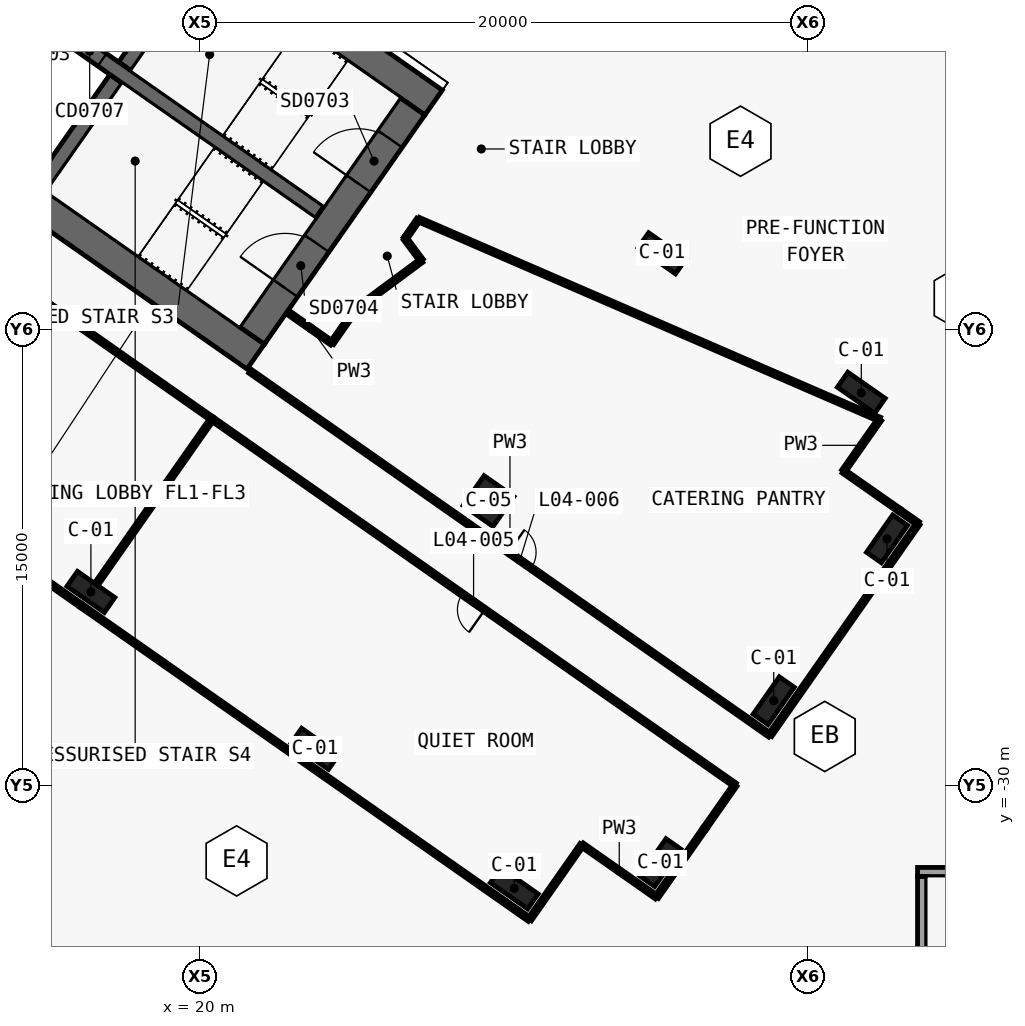
"""IFC4 building model, lengths in metres.
Left out: names, types, materials, properties, quantities, classifications, styles, units other than length and angle.
Written with IfcOpenShell. Run it as: python <this file> out.ifc"""

import sys

from ifc_helpers import new_model, si_unit, direction, frame, frame_2d, origin, origin_2d, place, context, subcontext, project, spatial, polyline, rectangle, outline, extrude, element, fill, save


model = new_model("IFC4")
c1 = context("Model", 3, precision=1e-05, world=origin(), true_north=direction((0.0, 1.0)))
c2 = subcontext(c1, "Body", "Model", "MODEL_VIEW")
j1 = project(units=[si_unit("LENGTHUNIT", "METRE"), si_unit("PLANEANGLEUNIT", "RADIAN")], contexts=[c1])
p1 = place(None, origin())
s1 = spatial("IfcSite", under=j1, at=p1, CompositionType="ELEMENT")
p2 = place(p1, origin())
s2 = spatial("IfcBuilding", under=s1, at=p2, CompositionType="ELEMENT")
p3 = place(p2, frame((0.0, 0.0, 32.0)))
s3 = spatial("IfcBuildingStorey", under=s2, at=p3, CompositionType="ELEMENT", Elevation=32.0)
p4 = place(p3, frame((-0.037, 11.867, 0.0), z_axis=(0.0, 0.0, 1.0), x_axis=(0.819155306259, -0.573571777746, 0.0)))
e1 = element("IfcWall", 1, at=p4, inside=s3, PredefinedType="SHEAR", context=c2, shape_type="SweptSolid", body=[
    extrude(outline(polyline([(33.837, 0.5), (0.0, 0.5), (0.7, -0.5), (33.837, -0.5), (33.837, 0.5)])), origin(), (0.0, 0.0, 1.0), 5.5),
])
p5 = place(p3, frame((-0.037, -0.585, 0.0), z_axis=(0.0, 0.0, 1.0), x_axis=(0.819157152511, -0.573569140985, 0.0)))
e2 = element("IfcWall", 2, at=p5, inside=s3, PredefinedType="SHEAR", context=c2, shape_type="SweptSolid", body=[
    extrude(outline(polyline([(26.695, 0.5), (0.0, 0.5), (0.7, -0.5), (26.695, -0.5), (26.695, 0.5)])), origin(), (0.0, 0.0, 1.0), 5.5),
])
p6 = place(p5, frame((1.045, 0.0, 0.0)))
e3 = element("IfcOpeningElement", 3, at=p6, cuts=e2, PredefinedType="OPENING", context=c2, shape_type="SweptSolid", body=[
    extrude(rectangle(XDim=1.5, YDim=2.1, at=frame_2d((0.75, 1.05))), frame((0.0, 0.51, 0.0), z_axis=(0.0, -1.0, 0.0), x_axis=(1.0, 0.0, 0.0)), (0.0, 0.0, 1.0), 1.02),
])
p7 = place(p5, frame((12.445, 0.0, 0.0)))
e4 = element("IfcOpeningElement", 4, at=p7, cuts=e2, PredefinedType="OPENING", context=c2, shape_type="SweptSolid", body=[
    extrude(rectangle(XDim=1.5, YDim=2.1, at=frame_2d((0.75, 1.05))), frame((0.0, 0.51, 0.0), z_axis=(0.0, -1.0, 0.0), x_axis=(1.0, 0.0, 0.0)), (0.0, 0.0, 1.0), 1.02),
])
p8 = place(p3, frame((21.708, -15.2, 0.0), z_axis=(0.0, 0.0, 1.0), x_axis=(0.573576324356, 0.819152122709, 0.0)))
e5 = element("IfcWall", 5, at=p8, inside=s3, PredefinedType="SHEAR", context=c2, shape_type="SweptSolid", body=[
    extrude(outline(polyline([(9.2, 0.5), (0.0, 0.5), (0.0, -0.5), (9.2, -0.5), (9.2, 0.5)])), origin(), (0.0, 0.0, 1.0), 5.5),
])
p9 = place(p8, frame((6.1, 0.0, 0.0)))
e6 = element("IfcOpeningElement", 6, at=p9, cuts=e5, PredefinedType="OPENING", context=c2, shape_type="SweptSolid", body=[
    extrude(rectangle(XDim=1.8, YDim=2.1, at=frame_2d((0.9, 1.05))), frame((0.0, 0.51, 0.0), z_axis=(0.0, -1.0, 0.0), x_axis=(1.0, 0.0, 0.0)), (0.0, 0.0, 1.0), 1.02),
])
p10 = place(p8, frame((1.9, 0.0, 0.0)))
e7 = element("IfcOpeningElement", 7, at=p10, cuts=e5, PredefinedType="OPENING", context=c2, shape_type="SweptSolid", body=[
    extrude(rectangle(XDim=1.8, YDim=2.1, at=frame_2d((0.9, 1.05))), frame((0.0, 0.51, 0.0), z_axis=(0.0, -1.0, 0.0), x_axis=(1.0, 0.0, 0.0)), (0.0, 0.0, 1.0), 1.02),
])
p11 = place(p3, frame((14.745, -10.324, 0.0), z_axis=(0.0, 0.0, 1.0), x_axis=(0.57356780395, 0.819158088694, 0.0)))
e8 = element("IfcWall", 8, at=p11, inside=s3, PredefinedType="SHEAR", context=c2, shape_type="SweptSolid", body=[
    extrude(outline(polyline([(0.0, 0.25), (0.0, -0.25), (4.35, -0.25), (4.35, 0.25), (0.0, 0.25)])), origin(), (0.0, 0.0, 1.0), 5.5),
])
p12 = place(p3, frame((17.527, -6.352, 0.0), z_axis=(0.0, 0.0, 1.0), x_axis=(0.573530143085, 0.819184457233, 0.0)))
e9 = element("IfcWall", 9, at=p12, inside=s3, PredefinedType="SHEAR", context=c2, shape_type="SweptSolid", body=[
    extrude(outline(polyline([(4.35, -0.25), (4.35, 0.25), (0.0, 0.25), (0.0, -0.25), (4.35, -0.25)])), origin(), (0.0, 0.0, 1.0), 5.5),
])
p13 = place(p3, frame((2.638, 3.768, 0.0), z_axis=(0.0, 0.0, 1.0), x_axis=(0.819148977158, -0.573580816643, 0.0)))
e10 = element("IfcWall", 10, at=p13, inside=s3, PredefinedType="SHEAR", context=c2, shape_type="SweptSolid", body=[
    extrude(outline(polyline([(0.0, 0.25), (0.0, -0.25), (26.0, -0.25), (26.0, 0.25), (0.0, 0.25)])), origin(), (0.0, 0.0, 1.0), 5.5),
])
p14 = place(p13, frame((9.637, 0.0, 0.0)))
e11 = element("IfcOpeningElement", 11, at=p14, cuts=e10, PredefinedType="OPENING", context=c2, shape_type="SweptSolid", body=[
    extrude(rectangle(XDim=1.2, YDim=2.1, at=frame_2d((0.6, 1.05))), frame((0.0, 0.26, 0.0), z_axis=(0.0, -1.0, 0.0), x_axis=(1.0, 0.0, 0.0)), (0.0, 0.0, 1.0), 0.52),
])
p15 = place(p13, frame((11.812, 0.0, 0.0)))
e12 = element("IfcOpeningElement", 12, at=p15, cuts=e10, PredefinedType="OPENING", context=c2, shape_type="SweptSolid", body=[
    extrude(rectangle(XDim=1.2, YDim=2.1, at=frame_2d((0.6, 1.05))), frame((0.0, 0.26, 0.0), z_axis=(0.0, -1.0, 0.0), x_axis=(1.0, 0.0, 0.0)), (0.0, 0.0, 1.0), 0.52),
])
p16 = place(p13, frame((13.988, 0.0, 0.0)))
e13 = element("IfcOpeningElement", 13, at=p16, cuts=e10, PredefinedType="OPENING", context=c2, shape_type="SweptSolid", body=[
    extrude(rectangle(XDim=1.2, YDim=2.1, at=frame_2d((0.6, 1.05))), frame((0.0, 0.26, 0.0), z_axis=(0.0, -1.0, 0.0), x_axis=(1.0, 0.0, 0.0)), (0.0, 0.0, 1.0), 0.52),
])
p17 = place(p13, frame((16.262, 0.0, 0.0)))
e14 = element("IfcOpeningElement", 14, at=p17, cuts=e10, PredefinedType="OPENING", context=c2, shape_type="SweptSolid", body=[
    extrude(rectangle(XDim=1.0, YDim=2.1, at=frame_2d((0.5, 1.05))), frame((0.0, 0.26, 0.0), z_axis=(0.0, -1.0, 0.0), x_axis=(1.0, 0.0, 0.0)), (0.0, 0.0, 1.0), 0.52),
])
p18 = place(p3, frame((43.6, -32.85, 0.0), z_axis=(0.0, 0.0, 1.0), x_axis=(1.0, 0.0, 0.0)))
e15 = element("IfcWall", 15, at=p18, inside=s3, PredefinedType="SOLIDWALL", context=c2, shape_type="SweptSolid", body=[
    extrude(rectangle(XDim=5.8, YDim=0.3, at=frame_2d((2.9, 0.0))), origin(), (0.0, 0.0, 1.0), 5.5),
])
p19 = place(p3, frame((43.75, -43.0, 0.0), z_axis=(0.0, 0.0, 1.0), x_axis=(0.0, 1.0, 0.0)))
e16 = element("IfcWall", 16, at=p19, inside=s3, PredefinedType="SOLIDWALL", context=c2, shape_type="SweptSolid", body=[
    extrude(rectangle(XDim=10.0, YDim=0.3, at=frame_2d((5.0, 0.0))), origin(), (0.0, 0.0, 1.0), 5.5),
])
p20 = place(p19, frame((0.212, 0.0, 0.0)))
e17 = element("IfcOpeningElement", 17, at=p20, cuts=e16, PredefinedType="OPENING", context=c2, shape_type="SweptSolid", body=[
    extrude(rectangle(XDim=2.1, YDim=2.1, at=frame_2d((1.05, 1.05))), frame((0.0, 0.16, 0.0), z_axis=(0.0, -1.0, 0.0), x_axis=(1.0, 0.0, 0.0)), (0.0, 0.0, 1.0), 0.32),
])
for number, where, z_axis, x_axis in (
    (18, (16.41, -23.637, 0.0), (0.0, 0.0, 1.0), (0.819, -0.574, 0.0)),
    (19, (23.782, -28.799, 0.0), (0.0, 0.0, 1.0), (0.819, -0.574, 0.0)),
    (20, (30.336, -33.388, 0.0), (0.0, 0.0, 1.0), (0.819, -0.574, 0.0)),
    (21, (35.197, -12.498, 0.0), (0.0, 0.0, 1.0), (0.819, -0.574, 0.0)),
    (22, (41.75, -17.087, 0.0), (0.0, 0.0, 1.0), (0.819, -0.574, 0.0)),
    (23, (35.14, -32.541, 0.0), (0.0, 0.0, 1.0), (0.574, 0.819, 0.0)),
    (24, (38.869, -27.216, 0.0), (0.0, 0.0, 1.0), (0.574, 0.819, 0.0)),
    (25, (42.597, -21.892, 0.0), (0.0, 0.0, 1.0), (0.574, 0.819, 0.0)),
):
    element("IfcColumn", number, at=place(p3, frame(where, z_axis=z_axis, x_axis=x_axis)), inside=s3, PredefinedType="COLUMN", context=c2, shape_type="SweptSolid", body=[
        extrude(rectangle(XDim=1.5, YDim=0.6, at=origin_2d()), origin(), (0.0, 0.0, 1.0), 5.5),
    ])
p21 = place(p3, frame((29.49, -20.649, 0.0), z_axis=(0.0, 0.0, 1.0), x_axis=(0.819152044289, -0.573576436351, 0.0)))
e26 = element("IfcColumn", 26, at=p21, inside=s3, PredefinedType="COLUMN", context=c2, shape_type="SweptSolid", body=[
    extrude(rectangle(XDim=1.2, YDim=1.2, at=origin_2d()), origin(), (0.0, 0.0, 1.0), 5.5),
])
p22 = place(p3, frame((21.642, -16.375, 0.0), z_axis=(0.0, 0.0, 1.0), x_axis=(0.819148965066, -0.573580833911, 0.0)))
e27 = element("IfcWall", 27, at=p22, inside=s3, PredefinedType="PARTITIONING", context=c2, shape_type="SweptSolid", body=[
    extrude(rectangle(XDim=20.88, YDim=0.15, at=frame_2d((10.44, 0.0))), origin(), (0.0, 0.0, 1.0), 3.68),
])
p23 = place(p22, frame((10.39, 0.0, 0.0)))
e28 = element("IfcOpeningElement", 28, at=p23, cuts=e27, PredefinedType="OPENING", context=c2, shape_type="SweptSolid", body=[
    extrude(rectangle(XDim=0.9, YDim=2.1, at=frame_2d((0.45, 1.05))), frame((0.0, 0.085, 0.0), z_axis=(0.0, -1.0, 0.0), x_axis=(1.0, 0.0, 0.0)), (0.0, 0.0, 1.0), 0.17),
])
p24 = place(p3, frame((20.398, -17.945, 0.0), z_axis=(0.0, 0.0, 1.0), x_axis=(-0.819147172988, 0.573583393228, 0.0)))
e29 = element("IfcWall", 29, at=p24, inside=s3, PredefinedType="PARTITIONING", context=c2, shape_type="SweptSolid", body=[
    extrude(rectangle(XDim=18.002, YDim=0.15, at=frame_2d((9.001, 0.0))), origin(), (0.0, 0.0, 1.0), 3.68),
])
p25 = place(p24, frame((8.101, 0.0, 0.0)))
e30 = element("IfcOpeningElement", 30, at=p25, cuts=e29, PredefinedType="OPENING", context=c2, shape_type="SweptSolid", body=[
    extrude(rectangle(XDim=1.8, YDim=2.4, at=frame_2d((0.9, 1.2))), frame((0.0, 0.085, 0.0), z_axis=(0.0, -1.0, 0.0), x_axis=(1.0, 0.0, 0.0)), (0.0, 0.0, 1.0), 0.17),
])
p26 = place(p3, frame((37.599, -29.989, 0.0), z_axis=(0.0, 0.0, 1.0), x_axis=(-0.819154909514, 0.573572344364, 0.0)))
e31 = element("IfcWall", 31, at=p26, inside=s3, PredefinedType="PARTITIONING", context=c2, shape_type="SweptSolid", body=[
    extrude(rectangle(XDim=21.002, YDim=0.15, at=frame_2d((10.501, 0.0))), origin(), (0.0, 0.0, 1.0), 3.68),
])
p27 = place(p26, frame((10.051, 0.0, 0.0)))
e32 = element("IfcOpeningElement", 32, at=p27, cuts=e31, PredefinedType="OPENING", context=c2, shape_type="SweptSolid", body=[
    extrude(rectangle(XDim=0.9, YDim=2.1, at=frame_2d((0.45, 1.05))), frame((0.0, 0.085, 0.0), z_axis=(0.0, -1.0, 0.0), x_axis=(1.0, 0.0, 0.0)), (0.0, 0.0, 1.0), 0.17),
])
p28 = place(p3, frame((42.357, -17.962, 0.0), z_axis=(0.0, 0.0, 1.0), x_axis=(-0.573533201177, -0.819182316183, 0.0)))
e33 = element("IfcWall", 33, at=p28, inside=s3, PredefinedType="PARTITIONING", context=c2, shape_type="SweptSolid", body=[
    extrude(rectangle(XDim=2.081, YDim=0.15, at=frame_2d((1.041, 0.0))), origin(), (0.0, 0.0, 1.0), 3.88),
])
p29 = place(p3, frame((41.164, -19.667, 0.0), z_axis=(0.0, 0.0, 1.0), x_axis=(0.81912956014, -0.573608545704, 0.0)))
e34 = element("IfcWall", 34, at=p29, inside=s3, PredefinedType="PARTITIONING", context=c2, shape_type="SweptSolid", body=[
    extrude(rectangle(XDim=2.241, YDim=0.15, at=frame_2d((1.121, 0.0))), origin(), (0.0, 0.0, 1.0), 3.88),
])
p30 = place(p3, frame((42.998, -20.952, 0.0), z_axis=(0.0, 0.0, 1.0), x_axis=(0.819141432686, -0.573591590992, 0.0)))
e35 = element("IfcWall", 35, at=p30, inside=s3, PredefinedType="PARTITIONING", context=c2, shape_type="SweptSolid", body=[
    extrude(rectangle(XDim=0.76, YDim=0.15, at=frame_2d((0.38, 0.0))), origin(), (0.0, 0.0, 1.0), 5.1),
])
p31 = place(p3, frame((43.621, -21.388, 0.0), z_axis=(0.0, 0.0, 1.0), x_axis=(-0.57357799764, -0.819150951061, 0.0)))
e36 = element("IfcWall", 36, at=p31, inside=s3, PredefinedType="PARTITIONING", context=c2, shape_type="SweptSolid", body=[
    extrude(rectangle(XDim=8.5, YDim=0.15, at=frame_2d((4.25, 0.0))), origin(), (0.0, 0.0, 1.0), 5.1),
])
p32 = place(p3, frame((26.746, -12.014, 0.0), z_axis=(0.0, 0.0, 1.0), x_axis=(0.573761975376, 0.819022097146, 0.0)))
e37 = element("IfcWall", 37, at=p32, inside=s3, PredefinedType="PARTITIONING", context=c2, shape_type="SweptSolid", body=[
    extrude(rectangle(XDim=0.765, YDim=0.15, at=frame_2d((0.383, 0.0))), origin(), (0.0, 0.0, 1.0), 5.1),
])
p33 = place(p3, frame((27.185, -11.387, 0.0), z_axis=(0.0, 0.0, 1.0), x_axis=(0.917531384635, -0.397663372979, 0.0)))
e38 = element("IfcWall", 38, at=p33, inside=s3, PredefinedType="PARTITIONING", context=c2, shape_type="SweptSolid", body=[
    extrude(rectangle(XDim=16.536, YDim=0.15, at=frame_2d((8.268, 0.0))), origin(), (0.0, 0.0, 1.0), 3.68),
])
p34 = place(p3, frame((22.961, -14.49, 0.0), z_axis=(0.0, 0.0, 1.0), x_axis=(0.819109000826, -0.573637903879, 0.0)))
e39 = element("IfcWall", 39, at=p34, inside=s3, PredefinedType="PARTITIONING", context=c2, shape_type="SweptSolid", body=[
    extrude(rectangle(XDim=1.68, YDim=0.15, at=frame_2d((0.84, 0.0))), origin(), (0.0, 0.0, 1.0), 5.1),
])
p35 = place(p3, frame((24.337, -15.454, 0.0), z_axis=(0.0, 0.0, 1.0), x_axis=(0.573571252353, 0.819155674139, 0.0)))
e40 = element("IfcWall", 40, at=p35, inside=s3, PredefinedType="PARTITIONING", context=c2, shape_type="SweptSolid", body=[
    extrude(rectangle(XDim=1.354, YDim=0.15, at=frame_2d((0.677, 0.0))), origin(), (0.0, 0.0, 1.0), 5.1),
])
p36 = place(p3, frame((25.114, -14.345, 0.0), z_axis=(0.0, 0.0, 1.0), x_axis=(0.803211070557, 0.595694532571, 0.0)))
e41 = element("IfcWall", 41, at=p36, inside=s3, PredefinedType="PARTITIONING", context=c2, shape_type="SweptSolid", body=[
    extrude(rectangle(XDim=2.7, YDim=0.15, at=frame_2d((1.35, 0.0))), origin(), (0.0, 0.0, 1.0), 5.1),
])
p37 = place(p3, frame((27.282, -12.737, 0.0), z_axis=(0.0, 0.0, 1.0), x_axis=(-0.595869495235, 0.803081281471, 0.0)))
e42 = element("IfcWall", 42, at=p37, inside=s3, PredefinedType="PARTITIONING", context=c2, shape_type="SweptSolid", body=[
    extrude(rectangle(XDim=0.9, YDim=0.15, at=frame_2d((0.45, 0.0))), origin(), (0.0, 0.0, 1.0), 5.1),
])
p38 = place(p3, frame((20.396, -17.944, 0.0), z_axis=(0.0, 0.0, 1.0), x_axis=(-0.57359826181, -0.819136761505, 0.0)))
e43 = element("IfcWall", 43, at=p38, inside=s3, PredefinedType="PARTITIONING", context=c2, shape_type="SweptSolid", body=[
    extrude(rectangle(XDim=6.63, YDim=0.15, at=frame_2d((3.315, 0.0))), origin(), (0.0, 0.0, 1.0), 3.68),
])
p39 = place(p3, frame((16.094, -24.088, 0.0), z_axis=(0.0, 0.0, 1.0), x_axis=(-0.819155454297, 0.573571566324, 0.0)))
e44 = element("IfcWall", 44, at=p39, inside=s3, PredefinedType="PARTITIONING", context=c2, shape_type="SweptSolid", body=[
    extrude(rectangle(XDim=7.351, YDim=0.15, at=frame_2d((3.675, 0.0))), origin(), (0.0, 0.0, 1.0), 5.1),
])
p40 = place(p3, frame((32.56, -31.955, 0.0), z_axis=(0.0, 0.0, 1.0), x_axis=(-0.573560650686, -0.819163097304, 0.0)))
e45 = element("IfcWall", 45, at=p40, inside=s3, PredefinedType="PARTITIONING", context=c2, shape_type="SweptSolid", body=[
    extrude(rectangle(XDim=3.0, YDim=0.15, at=frame_2d((1.5, 0.0))), origin(), (0.0, 0.0, 1.0), 3.88),
])
p41 = place(p3, frame((30.839, -34.412, 0.0), z_axis=(0.0, 0.0, 1.0), x_axis=(-0.81915226268, 0.573576124456, 0.0)))
e46 = element("IfcWall", 46, at=p41, inside=s3, PredefinedType="PARTITIONING", context=c2, shape_type="SweptSolid", body=[
    extrude(rectangle(XDim=18.0, YDim=0.15, at=frame_2d((9.0, 0.0))), origin(), (0.0, 0.0, 1.0), 5.1),
])
p42 = place(p3, frame((36.599, -31.417, 0.0), z_axis=(0.0, 0.0, 1.0), x_axis=(-0.573557416232, -0.819165361991, 0.0)))
e47 = element("IfcWall", 47, at=p42, inside=s3, PredefinedType="PARTITIONING", context=c2, shape_type="SweptSolid", body=[
    extrude(rectangle(XDim=2.757, YDim=0.15, at=frame_2d((1.379, 0.0))), origin(), (0.0, 0.0, 1.0), 5.1),
])
p43 = place(p3, frame((35.018, -33.675, 0.0), z_axis=(0.0, 0.0, 1.0), x_axis=(-0.819163097304, 0.573560650686, 0.0)))
e48 = element("IfcWall", 48, at=p43, inside=s3, PredefinedType="PARTITIONING", context=c2, shape_type="SweptSolid", body=[
    extrude(rectangle(XDim=3.0, YDim=0.15, at=frame_2d((1.5, 0.0))), origin(), (0.0, 0.0, 1.0), 3.88),
])
p44 = place(p3, frame((37.599, -29.989, 0.0), z_axis=(0.0, 0.0, 1.0), x_axis=(-0.573575034625, -0.819153025786, 0.0)))
e49 = element("IfcWall", 49, at=p44, inside=s3, PredefinedType="PARTITIONING", context=c2, shape_type="SweptSolid", body=[
    extrude(rectangle(XDim=1.745, YDim=0.15, at=frame_2d((0.872, 0.0))), origin(), (0.0, 0.0, 1.0), 5.1),
])
p45 = place(p17, origin())
e50 = element("IfcDoor", 50, at=p45, inside=s3, OperationType="SINGLE_SWING_RIGHT", PredefinedType="DOOR", context=c2, shape_type="SweptSolid", body=[
    extrude(rectangle(XDim=1.0, YDim=2.1, at=frame_2d((0.5, 1.05))), frame((0.0, 0.025, 0.0), z_axis=(0.0, -1.0, 0.0), x_axis=(1.0, 0.0, 0.0)), (0.0, 0.0, 1.0), 0.05),
])
fill(e14, e50)
p46 = place(p9, origin())
e51 = element("IfcDoor", 51, at=p46, inside=s3, OperationType="DOUBLE_DOOR_SINGLE_SWING", PredefinedType="DOOR", context=c2, shape_type="SweptSolid", body=[
    extrude(rectangle(XDim=1.8, YDim=2.1, at=frame_2d((0.9, 1.05))), frame((0.0, 0.025, 0.0), z_axis=(0.0, -1.0, 0.0), x_axis=(1.0, 0.0, 0.0)), (0.0, 0.0, 1.0), 0.05),
])
fill(e6, e51)
p47 = place(p10, origin())
e52 = element("IfcDoor", 52, at=p47, inside=s3, OperationType="DOUBLE_DOOR_SINGLE_SWING", PredefinedType="DOOR", context=c2, shape_type="SweptSolid", body=[
    extrude(rectangle(XDim=1.8, YDim=2.1, at=frame_2d((0.9, 1.05))), frame((0.0, 0.025, 0.0), z_axis=(0.0, -1.0, 0.0), x_axis=(1.0, 0.0, 0.0)), (0.0, 0.0, 1.0), 0.05),
])
fill(e7, e52)
p48 = place(p27, origin())
e53 = element("IfcDoor", 53, at=p48, inside=s3, OperationType="SINGLE_SWING_RIGHT", PredefinedType="DOOR", context=c2, shape_type="SweptSolid", body=[
    extrude(rectangle(XDim=0.9, YDim=2.1, at=frame_2d((0.45, 1.05))), frame((0.0, 0.025, 0.0), z_axis=(0.0, -1.0, 0.0), x_axis=(1.0, 0.0, 0.0)), (0.0, 0.0, 1.0), 0.05),
])
fill(e32, e53)
p49 = place(p23, origin())
e54 = element("IfcDoor", 54, at=p49, inside=s3, OperationType="SINGLE_SWING_RIGHT", PredefinedType="DOOR", context=c2, shape_type="SweptSolid", body=[
    extrude(rectangle(XDim=0.9, YDim=2.1, at=frame_2d((0.45, 1.05))), frame((0.0, 0.025, 0.0), z_axis=(0.0, -1.0, 0.0), x_axis=(1.0, 0.0, 0.0)), (0.0, 0.0, 1.0), 0.05),
])
fill(e28, e54)
save(model, sys.argv[1])
